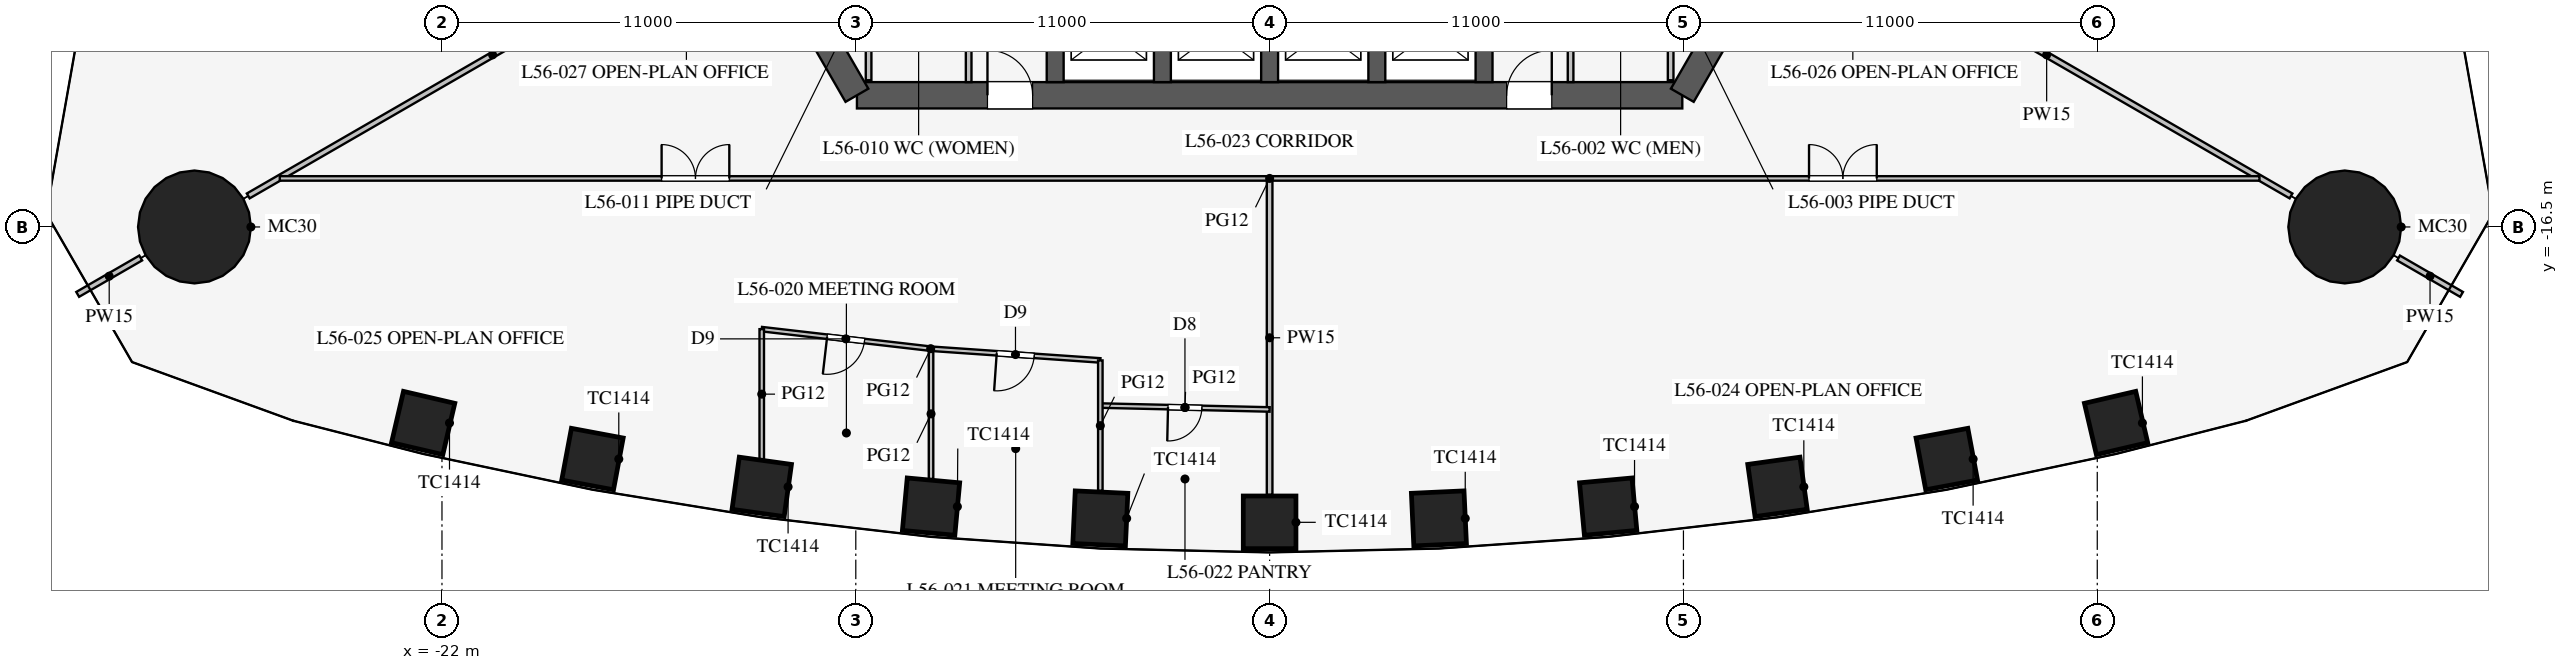
"""IFC4 building model, lengths in metres.
Left out: names, types, materials, properties, quantities, classifications, styles, units other than length and angle.
Written with IfcOpenShell. Run it as: python <this file> out.ifc"""

import sys

from ifc_helpers import new_model, si_unit, direction, frame, frame_2d, origin, origin_2d, place, context, subcontext, project, spatial, rectangle, circle, extrude, element, fill, save


model = new_model("IFC4")
c1 = context("Model", 3, precision=1e-05, world=origin(), true_north=direction((0.0, 1.0)))
c2 = subcontext(c1, "Body", "Model", "MODEL_VIEW")
j1 = project(units=[si_unit("LENGTHUNIT", "METRE"), si_unit("PLANEANGLEUNIT", "RADIAN")], contexts=[c1])
p1 = place(None, origin())
s1 = spatial("IfcSite", under=j1, at=p1, CompositionType="ELEMENT")
p2 = place(p1, origin())
s2 = spatial("IfcBuilding", under=s1, at=p2, CompositionType="ELEMENT")
p3 = place(p2, frame((0.0, 0.0, 244.3)))
s3 = spatial("IfcBuildingStorey", under=s2, at=p3, CompositionType="ELEMENT", Elevation=244.3)
for number, where, z_axis, x_axis in (
    (1, (-22.5, -21.71, 0.0), (0.0, 0.0, 1.0), (0.974, -0.227, 0.0)),
    (2, (-18.0, -22.669, 0.0), (0.0, 0.0, 1.0), (0.983, -0.184, 0.0)),
    (3, (-13.5, -23.408, 0.0), (0.0, 0.0, 1.0), (0.99, -0.138, 0.0)),
    (4, (-9.0, -23.933, 0.0), (0.0, 0.0, 1.0), (0.996, -0.092, 0.0)),
    (5, (-4.5, -24.246, 0.0), (0.0, 0.0, 1.0), (0.999, -0.046, 0.0)),
    (6, (0.0, -24.351, 0.0), (0.0, 0.0, 1.0), (1.0, 0.0, 0.0)),
    (7, (4.5, -24.246, 0.0), (0.0, 0.0, 1.0), (0.999, 0.046, 0.0)),
    (8, (9.0, -23.933, 0.0), (0.0, 0.0, 1.0), (0.996, 0.092, 0.0)),
    (9, (13.5, -23.408, 0.0), (0.0, 0.0, 1.0), (0.99, 0.138, 0.0)),
    (10, (18.0, -22.669, 0.0), (0.0, 0.0, 1.0), (0.983, 0.184, 0.0)),
    (11, (22.5, -21.71, 0.0), (0.0, 0.0, 1.0), (0.974, 0.227, 0.0)),
):
    element("IfcColumn", number, at=place(p3, frame(where, z_axis=z_axis, x_axis=x_axis)), inside=s3, PredefinedType="COLUMN", context=c2, shape_type="SweptSolid", body=[
        extrude(rectangle(XDim=1.4, YDim=1.4, at=origin_2d()), origin(), (0.0, 0.0, 1.0), 4.2),
    ])
for number, where, z_axis, x_axis in (
    (12, (28.579, -16.5, 0.0), (0.0, 0.0, 1.0), (1.0, 0.0, 0.0)),
    (13, (-28.579, -16.5, 0.0), (0.0, 0.0, 1.0), (1.0, 0.0, 0.0)),
):
    element("IfcColumn", number, at=place(p3, frame(where, z_axis=z_axis, x_axis=x_axis)), inside=s3, PredefinedType="COLUMN", context=c2, shape_type="SweptSolid", body=[
        extrude(circle(Radius=1.5, at=origin_2d()), origin(), (0.0, 0.0, 1.0), 4.2),
    ])
p4 = place(p3, frame((-10.97, -13.0, 0.0), z_axis=(0.0, 0.0, 1.0), x_axis=(1.0, 0.0, 0.0)))
e14 = element("IfcWall", 14, at=p4, inside=s3, PredefinedType="SHEAR", context=c2, shape_type="SweptSolid", body=[
    extrude(rectangle(XDim=21.939, YDim=0.7, at=frame_2d((10.97, 0.0))), origin(), (0.0, 0.0, 1.0), 4.2),
])
p5 = place(p4, frame((17.27, 0.0, 0.0)))
e15 = element("IfcOpeningElement", 15, at=p5, cuts=e14, PredefinedType="OPENING", context=c2, shape_type="SweptSolid", body=[
    extrude(rectangle(XDim=1.2, YDim=2.1, at=frame_2d((0.6, 1.05))), frame((0.0, 0.36, 0.0), z_axis=(0.0, -1.0, 0.0), x_axis=(1.0, 0.0, 0.0)), (0.0, 0.0, 1.0), 0.72),
])
p6 = place(p4, frame((3.47, 0.0, 0.0)))
e16 = element("IfcOpeningElement", 16, at=p6, cuts=e14, PredefinedType="OPENING", context=c2, shape_type="SweptSolid", body=[
    extrude(rectangle(XDim=1.2, YDim=2.1, at=frame_2d((0.6, 1.05))), frame((0.0, 0.36, 0.0), z_axis=(0.0, -1.0, 0.0), x_axis=(1.0, 0.0, 0.0)), (0.0, 0.0, 1.0), 0.72),
])
for number, where, z_axis, x_axis in (
    (17, (10.97, -13.0, 0.0), (0.0, 0.0, 1.0), (0.5, 0.866, 0.0)),
    (18, (-16.743, -3.0, 0.0), (0.0, 0.0, 1.0), (0.5, -0.866, 0.0)),
):
    element("IfcWall", number, at=place(p3, frame(where, z_axis=z_axis, x_axis=x_axis)), inside=s3, PredefinedType="SHEAR", context=c2, shape_type="SweptSolid", body=[
        extrude(rectangle(XDim=11.547, YDim=0.7, at=frame_2d((5.773, 0.0))), origin(), (0.0, 0.0, 1.0), 4.2),
    ])
for number, where, z_axis, x_axis in (
    (19, (-5.7, -10.025, 0.0), (0.0, 0.0, 1.0), (0.0, -1.0, 0.0)),
    (20, (-2.85, -10.025, 0.0), (0.0, 0.0, 1.0), (0.0, -1.0, 0.0)),
    (21, (0.0, -10.025, 0.0), (0.0, 0.0, 1.0), (0.0, -1.0, 0.0)),
    (22, (2.85, -10.025, 0.0), (0.0, 0.0, 1.0), (0.0, -1.0, 0.0)),
    (23, (5.7, -10.025, 0.0), (0.0, 0.0, 1.0), (0.0, -1.0, 0.0)),
):
    element("IfcWall", number, at=place(p3, frame(where, z_axis=z_axis, x_axis=x_axis)), inside=s3, PredefinedType="SHEAR", context=c2, shape_type="SweptSolid", body=[
        extrude(rectangle(XDim=2.625, YDim=0.45, at=frame_2d((1.312, 0.0))), origin(), (0.0, 0.0, 1.0), 4.2),
    ])
p7 = place(p3, frame((8.0, -7.5, 0.0), z_axis=(0.0, 0.0, 1.0), x_axis=(0.0, -1.0, 0.0)))
e24 = element("IfcWall", 24, at=p7, inside=s3, PredefinedType="PARTITIONING", context=c2, shape_type="SweptSolid", body=[
    extrude(rectangle(XDim=5.15, YDim=0.15, at=frame_2d((2.575, 0.0))), origin(), (0.0, 0.0, 1.0), 4.0),
])
p8 = place(p7, frame((1.3, 0.0, 0.0)))
e25 = element("IfcOpeningElement", 25, at=p8, cuts=e24, PredefinedType="OPENING", context=c2, shape_type="SweptSolid", body=[
    extrude(rectangle(XDim=0.9, YDim=2.1, at=frame_2d((0.45, 1.05))), frame((0.0, 0.085, 0.0), z_axis=(0.0, -1.0, 0.0), x_axis=(1.0, 0.0, 0.0)), (0.0, 0.0, 1.0), 0.17),
])
p9 = place(p3, frame((-8.0, -7.5, 0.0), z_axis=(0.0, 0.0, 1.0), x_axis=(0.0, -1.0, 0.0)))
e26 = element("IfcWall", 26, at=p9, inside=s3, PredefinedType="PARTITIONING", context=c2, shape_type="SweptSolid", body=[
    extrude(rectangle(XDim=5.15, YDim=0.15, at=frame_2d((2.575, 0.0))), origin(), (0.0, 0.0, 1.0), 4.0),
])
p10 = place(p9, frame((2.6, 0.0, 0.0)))
e27 = element("IfcOpeningElement", 27, at=p10, cuts=e26, PredefinedType="OPENING", context=c2, shape_type="SweptSolid", body=[
    extrude(rectangle(XDim=0.9, YDim=2.1, at=frame_2d((0.45, 1.05))), frame((0.0, 0.085, 0.0), z_axis=(0.0, -1.0, 0.0), x_axis=(1.0, 0.0, 0.0)), (0.0, 0.0, 1.0), 0.17),
])
for number, where, z_axis, x_axis in (
    (28, (10.66, -8.5, 0.0), (0.0, 0.0, 1.0), (0.0, -1.0, 0.0)),
    (29, (-10.66, -8.5, 0.0), (0.0, 0.0, 1.0), (0.0, -1.0, 0.0)),
):
    element("IfcWall", number, at=place(p3, frame(where, z_axis=z_axis, x_axis=x_axis)), inside=s3, PredefinedType="PARTITIONING", context=c2, shape_type="SweptSolid", body=[
        extrude(rectangle(XDim=4.1, YDim=0.15, at=frame_2d((2.05, 0.0))), origin(), (0.0, 0.0, 1.0), 4.0),
    ])
p11 = place(p3, frame((14.159, -8.175, 0.0), z_axis=(0.0, 0.0, 1.0), x_axis=(0.866027028085, -0.499997186618, 0.0)))
e30 = element("IfcWall", 30, at=p11, inside=s3, PredefinedType="PARTITIONING", context=c2, shape_type="SweptSolid", body=[
    extrude(rectangle(XDim=15.0, YDim=0.15, at=frame_2d((7.5, 0.0))), origin(), (0.0, 0.0, 1.0), 2.4),
])
p12 = place(p3, frame((30.008, -17.325, 0.0), z_axis=(0.0, 0.0, 1.0), x_axis=(0.866013246922, -0.500021055713, 0.0)))
e31 = element("IfcWall", 31, at=p12, inside=s3, PredefinedType="PARTITIONING", context=c2, shape_type="SweptSolid", body=[
    extrude(rectangle(XDim=1.935, YDim=0.15, at=frame_2d((0.967, 0.0))), origin(), (0.0, 0.0, 1.0), 2.4),
])
p13 = place(p3, frame((-14.159, -8.175, 0.0), z_axis=(0.0, 0.0, 1.0), x_axis=(-0.866027028085, -0.499997186618, 0.0)))
e32 = element("IfcWall", 32, at=p13, inside=s3, PredefinedType="PARTITIONING", context=c2, shape_type="SweptSolid", body=[
    extrude(rectangle(XDim=15.0, YDim=0.15, at=frame_2d((7.5, 0.0))), origin(), (0.0, 0.0, 1.0), 2.4),
])
p14 = place(p3, frame((-30.008, -17.325, 0.0), z_axis=(0.0, 0.0, 1.0), x_axis=(-0.866013246922, -0.500021055713, 0.0)))
e33 = element("IfcWall", 33, at=p14, inside=s3, PredefinedType="PARTITIONING", context=c2, shape_type="SweptSolid", body=[
    extrude(rectangle(XDim=1.935, YDim=0.15, at=frame_2d((0.967, 0.0))), origin(), (0.0, 0.0, 1.0), 2.4),
])
p15 = place(p3, frame((0.0, -15.27, 0.0), z_axis=(0.0, 0.0, 1.0), x_axis=(0.0, -1.0, 0.0)))
e34 = element("IfcWall", 34, at=p15, inside=s3, PredefinedType="PARTITIONING", context=c2, shape_type="SweptSolid", body=[
    extrude(rectangle(XDim=8.351, YDim=0.15, at=frame_2d((4.175, 0.0))), origin(), (0.0, 0.0, 1.0), 2.992),
])
p16 = place(p3, frame((-26.312, -15.21, 0.0), z_axis=(0.0, 0.0, 1.0), x_axis=(1.0, 0.0, 0.0)))
e35 = element("IfcWall", 35, at=p16, inside=s3, PredefinedType="PARTITIONING", context=c2, shape_type="SweptSolid", body=[
    extrude(rectangle(XDim=52.624, YDim=0.12, at=frame_2d((26.312, 0.0))), origin(), (0.0, 0.0, 1.0), 2.9),
])
p17 = place(p16, frame((10.15, 0.0, 0.15)))
e36 = element("IfcOpeningElement", 36, at=p17, cuts=e35, PredefinedType="OPENING", context=c2, shape_type="SweptSolid", body=[
    extrude(rectangle(XDim=1.8, YDim=2.1, at=frame_2d((0.9, 1.05))), frame((0.0, 0.07, 0.0), z_axis=(0.0, -1.0, 0.0), x_axis=(1.0, 0.0, 0.0)), (0.0, 0.0, 1.0), 0.14),
])
p18 = place(p16, frame((40.65, 0.0, 0.15)))
e37 = element("IfcOpeningElement", 37, at=p18, cuts=e35, PredefinedType="OPENING", context=c2, shape_type="SweptSolid", body=[
    extrude(rectangle(XDim=1.8, YDim=2.1, at=frame_2d((0.9, 1.05))), frame((0.0, 0.07, 0.0), z_axis=(0.0, -1.0, 0.0), x_axis=(1.0, 0.0, 0.0)), (0.0, 0.0, 1.0), 0.14),
])
p19 = place(p3, frame((-13.5, -19.216, 0.0), z_axis=(0.0, 0.0, 1.0), x_axis=(0.993382946625, -0.114849124309, 0.0)))
e38 = element("IfcWall", 38, at=p19, inside=s3, PredefinedType="PARTITIONING", context=c2, shape_type="SweptSolid", body=[
    extrude(rectangle(XDim=4.53, YDim=0.12, at=frame_2d((2.265, 0.0))), origin(), (0.0, 0.0, 1.0), 2.9),
])
p20 = place(p19, frame((1.75, 0.0, 0.15)))
e39 = element("IfcOpeningElement", 39, at=p20, cuts=e38, PredefinedType="OPENING", context=c2, shape_type="SweptSolid", body=[
    extrude(rectangle(XDim=1.0, YDim=2.1, at=frame_2d((0.5, 1.05))), frame((0.0, 0.07, 0.0), z_axis=(0.0, -1.0, 0.0), x_axis=(1.0, 0.0, 0.0)), (0.0, 0.0, 1.0), 0.14),
])
p21 = place(p3, frame((-4.5, -21.247, 0.0), z_axis=(0.0, 0.0, 1.0), x_axis=(0.99973677065, -0.022943177842, 0.0)))
e40 = element("IfcWall", 40, at=p21, inside=s3, PredefinedType="PARTITIONING", context=c2, shape_type="SweptSolid", body=[
    extrude(rectangle(XDim=4.501, YDim=0.12, at=frame_2d((2.25, 0.0))), origin(), (0.0, 0.0, 1.0), 2.9),
])
p22 = place(p21, frame((1.8, 0.0, 0.15)))
e41 = element("IfcOpeningElement", 41, at=p22, cuts=e40, PredefinedType="OPENING", context=c2, shape_type="SweptSolid", body=[
    extrude(rectangle(XDim=0.9, YDim=2.1, at=frame_2d((0.45, 1.05))), frame((0.0, 0.07, 0.0), z_axis=(0.0, -1.0, 0.0), x_axis=(1.0, 0.0, 0.0)), (0.0, 0.0, 1.0), 0.14),
])
p23 = place(p3, frame((-9.0, -19.736, 0.0), z_axis=(0.0, 0.0, 1.0), x_axis=(0.997623533978, -0.068900540297, 0.0)))
e42 = element("IfcWall", 42, at=p23, inside=s3, PredefinedType="PARTITIONING", context=c2, shape_type="SweptSolid", body=[
    extrude(rectangle(XDim=4.511, YDim=0.12, at=frame_2d((2.255, 0.0))), origin(), (0.0, 0.0, 1.0), 2.9),
])
p24 = place(p23, frame((1.75, 0.0, 0.15)))
e43 = element("IfcOpeningElement", 43, at=p24, cuts=e42, PredefinedType="OPENING", context=c2, shape_type="SweptSolid", body=[
    extrude(rectangle(XDim=1.0, YDim=2.1, at=frame_2d((0.5, 1.05))), frame((0.0, 0.07, 0.0), z_axis=(0.0, -1.0, 0.0), x_axis=(1.0, 0.0, 0.0)), (0.0, 0.0, 1.0), 0.14),
])
p25 = place(p3, frame((-13.5, -19.216, 0.0), z_axis=(0.0, 0.0, 1.0), x_axis=(0.0, -1.0, 0.0)))
e44 = element("IfcWall", 44, at=p25, inside=s3, PredefinedType="PARTITIONING", context=c2, shape_type="SweptSolid", body=[
    extrude(rectangle(XDim=3.455, YDim=0.12, at=frame_2d((1.728, 0.0))), origin(), (0.0, 0.0, 1.0), 2.8),
])
p26 = place(p3, frame((-4.5, -20.047, 0.0), z_axis=(0.0, 0.0, 1.0), x_axis=(0.0, -1.0, 0.0)))
e45 = element("IfcWall", 45, at=p26, inside=s3, PredefinedType="PARTITIONING", context=c2, shape_type="SweptSolid", body=[
    extrude(rectangle(XDim=3.469, YDim=0.12, at=frame_2d((1.734, 0.0))), origin(), (0.0, 0.0, 1.0), 2.9),
])
p27 = place(p3, frame((-9.0, -19.736, 0.0), z_axis=(0.0, 0.0, 1.0), x_axis=(0.0, -1.0, 0.0)))
e46 = element("IfcWall", 46, at=p27, inside=s3, PredefinedType="PARTITIONING", context=c2, shape_type="SweptSolid", body=[
    extrude(rectangle(XDim=3.464, YDim=0.12, at=frame_2d((1.732, 0.0))), origin(), (0.0, 0.0, 1.0), 2.9),
])
p28 = place(p5, origin())
e47 = element("IfcDoor", 47, at=p28, inside=s3, OperationType="SINGLE_SWING_RIGHT", PredefinedType="DOOR", context=c2, shape_type="SweptSolid", body=[
    extrude(rectangle(XDim=1.2, YDim=2.1, at=frame_2d((0.6, 1.05))), frame((0.0, 0.025, 0.0), z_axis=(0.0, -1.0, 0.0), x_axis=(1.0, 0.0, 0.0)), (0.0, 0.0, 1.0), 0.05),
])
fill(e15, e47)
p29 = place(p6, origin())
e48 = element("IfcDoor", 48, at=p29, inside=s3, OperationType="SINGLE_SWING_LEFT", PredefinedType="DOOR", context=c2, shape_type="SweptSolid", body=[
    extrude(rectangle(XDim=1.2, YDim=2.1, at=frame_2d((0.6, 1.05))), frame((0.0, 0.025, 0.0), z_axis=(0.0, -1.0, 0.0), x_axis=(1.0, 0.0, 0.0)), (0.0, 0.0, 1.0), 0.05),
])
fill(e16, e48)
p30 = place(p20, frame((1.0, 0.0, 0.0), z_axis=(0.0, 0.0, 1.0), x_axis=(-1.0, 0.0, 0.0)))
e49 = element("IfcDoor", 49, at=p30, inside=s3, OperationType="SINGLE_SWING_RIGHT", PredefinedType="DOOR", context=c2, shape_type="SweptSolid", body=[
    extrude(rectangle(XDim=1.0, YDim=2.1, at=frame_2d((0.5, 1.05))), frame((0.0, 0.025, 0.0), z_axis=(0.0, -1.0, 0.0), x_axis=(1.0, 0.0, 0.0)), (0.0, 0.0, 1.0), 0.05),
])
fill(e39, e49)
p31 = place(p24, frame((1.0, 0.0, 0.0), z_axis=(0.0, 0.0, 1.0), x_axis=(-1.0, 0.0, 0.0)))
e50 = element("IfcDoor", 50, at=p31, inside=s3, OperationType="SINGLE_SWING_RIGHT", PredefinedType="DOOR", context=c2, shape_type="SweptSolid", body=[
    extrude(rectangle(XDim=1.0, YDim=2.1, at=frame_2d((0.5, 1.05))), frame((0.0, 0.025, 0.0), z_axis=(0.0, -1.0, 0.0), x_axis=(1.0, 0.0, 0.0)), (0.0, 0.0, 1.0), 0.05),
])
fill(e43, e50)
p32 = place(p22, frame((0.9, 0.0, 0.0), z_axis=(0.0, 0.0, 1.0), x_axis=(-1.0, 0.0, 0.0)))
e51 = element("IfcDoor", 51, at=p32, inside=s3, OperationType="SINGLE_SWING_RIGHT", PredefinedType="DOOR", context=c2, shape_type="SweptSolid", body=[
    extrude(rectangle(XDim=0.9, YDim=2.1, at=frame_2d((0.45, 1.05))), frame((0.0, 0.025, 0.0), z_axis=(0.0, -1.0, 0.0), x_axis=(1.0, 0.0, 0.0)), (0.0, 0.0, 1.0), 0.05),
])
fill(e41, e51)
p33 = place(p17, origin())
e52 = element("IfcDoor", 52, at=p33, inside=s3, OperationType="DOUBLE_DOOR_SINGLE_SWING", PredefinedType="DOOR", context=c2, shape_type="SweptSolid", body=[
    extrude(rectangle(XDim=1.8, YDim=2.1, at=frame_2d((0.9, 1.05))), frame((0.0, 0.025, 0.0), z_axis=(0.0, -1.0, 0.0), x_axis=(1.0, 0.0, 0.0)), (0.0, 0.0, 1.0), 0.05),
])
fill(e36, e52)
p34 = place(p18, origin())
e53 = element("IfcDoor", 53, at=p34, inside=s3, OperationType="DOUBLE_DOOR_SINGLE_SWING", PredefinedType="DOOR", context=c2, shape_type="SweptSolid", body=[
    extrude(rectangle(XDim=1.8, YDim=2.1, at=frame_2d((0.9, 1.05))), frame((0.0, 0.025, 0.0), z_axis=(0.0, -1.0, 0.0), x_axis=(1.0, 0.0, 0.0)), (0.0, 0.0, 1.0), 0.05),
])
fill(e37, e53)
save(model, sys.argv[1])
